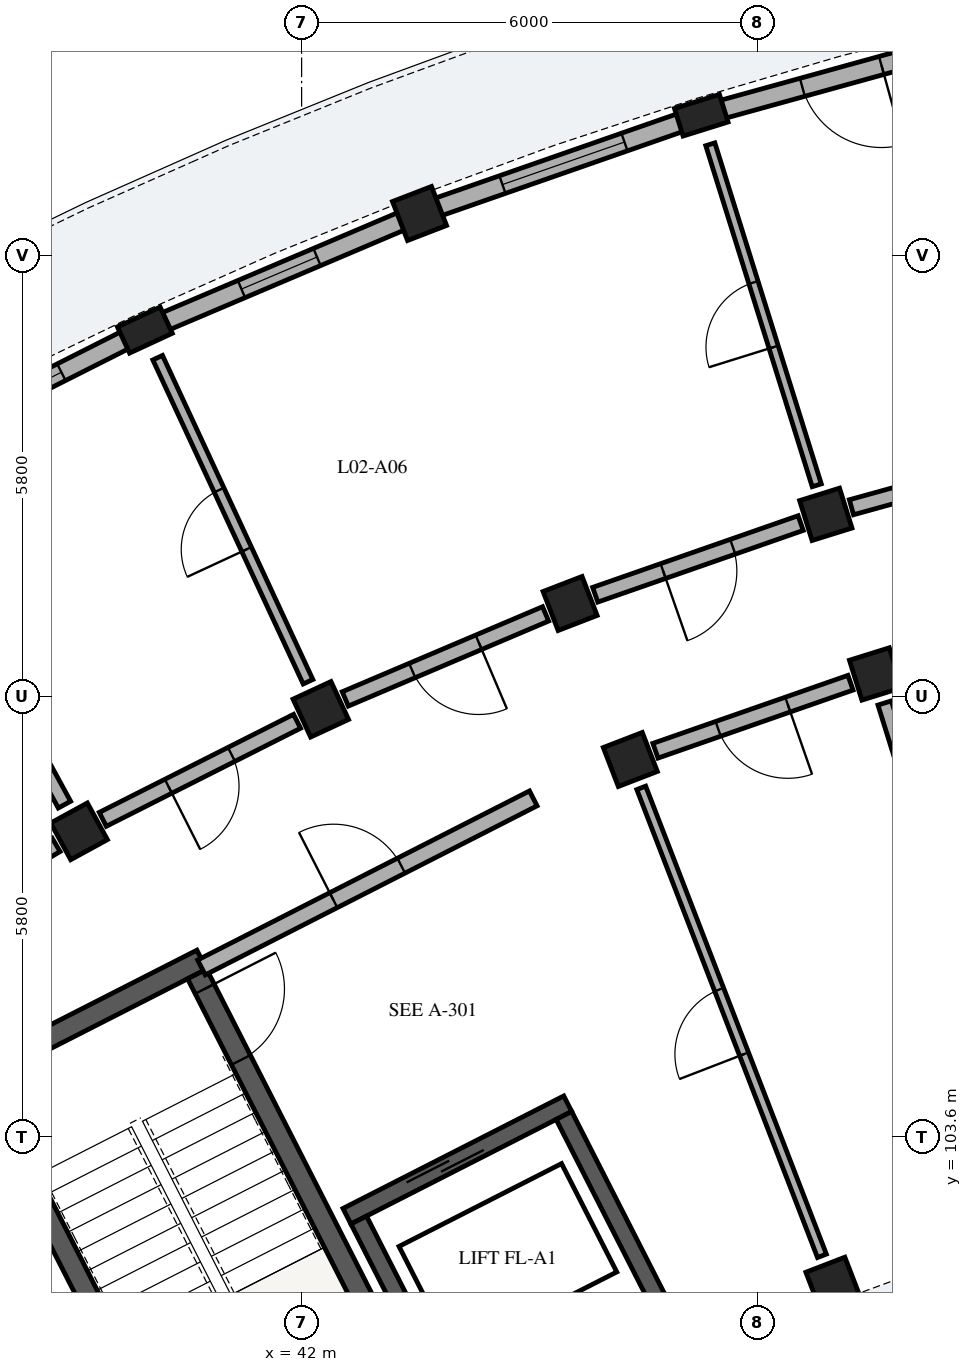
"""IFC4 building model, lengths in metres.
Left out: names, types, materials, properties, quantities, classifications, styles, units other than length and angle.
Written with IfcOpenShell. Run it as: python <this file> out.ifc"""

import sys

from ifc_helpers import new_model, si_unit, direction, frame, frame_2d, origin, origin_2d, place, context, subcontext, project, spatial, rectangle, extrude, element, fill, save


model = new_model("IFC4")
c1 = context("Model", 3, precision=1e-05, world=origin(), true_north=direction((0.0, 1.0)))
c2 = subcontext(c1, "Body", "Model", "MODEL_VIEW")
j1 = project(units=[si_unit("LENGTHUNIT", "METRE"), si_unit("PLANEANGLEUNIT", "RADIAN")], contexts=[c1])
p1 = place(None, origin())
s1 = spatial("IfcSite", under=j1, at=p1, CompositionType="ELEMENT")
p2 = place(p1, origin())
s2 = spatial("IfcBuilding", under=s1, at=p2, CompositionType="ELEMENT")
p3 = place(p2, frame((0.0, 0.0, 8.84)))
s3 = spatial("IfcBuildingStorey", under=s2, at=p3, CompositionType="ELEMENT", Elevation=8.84)
p4 = place(p3, frame((37.773, 104.296, 0.0), z_axis=(0.0, 0.0, 1.0), x_axis=(0.453992276384, -0.891005618941, 0.0)))
e1 = element("IfcWall", 1, at=p4, inside=s3, PredefinedType="SHEAR", context=c2, shape_type="SweptSolid", body=[
    extrude(rectangle(XDim=6.6, YDim=0.28, at=frame_2d((3.3, 0.0))), origin(), (0.0, 0.0, 1.0), 3.11),
])
p5 = place(p3, frame((37.585, 104.357, 0.0), z_axis=(0.0, 0.0, 1.0), x_axis=(0.891020222667, 0.453963613958, 0.0)))
e2 = element("IfcWall", 2, at=p5, inside=s3, PredefinedType="SHEAR", context=c2, shape_type="SweptSolid", body=[
    extrude(rectangle(XDim=3.48, YDim=0.28, at=frame_2d((1.74, 0.0))), origin(), (0.0, 0.0, 1.0), 3.11),
])
p6 = place(p3, frame((40.625, 105.748, 0.0), z_axis=(0.0, 0.0, 1.0), x_axis=(0.453992276384, -0.891005618941, 0.0)))
e3 = element("IfcWall", 3, at=p6, inside=s3, PredefinedType="SHEAR", context=c2, shape_type="SweptSolid", body=[
    extrude(rectangle(XDim=6.6, YDim=0.28, at=frame_2d((3.3, 0.0))), origin(), (0.0, 0.0, 1.0), 3.11),
])
p7 = place(p6, frame((0.22, 0.0, 0.0)))
e4 = element("IfcOpeningElement", 4, at=p7, cuts=e3, PredefinedType="OPENING", context=c2, shape_type="SweptSolid", body=[
    extrude(rectangle(XDim=1.05, YDim=2.15, at=frame_2d((0.525, 1.075))), frame((0.0, 0.15, 0.0), z_axis=(0.0, -1.0, 0.0), x_axis=(1.0, 0.0, 0.0)), (0.0, 0.0, 1.0), 0.3),
])
p8 = place(p3, frame((42.597, 102.561, 0.0), z_axis=(0.0, 0.0, 1.0), x_axis=(0.891001200497, 0.454000947921, 0.0)))
e5 = element("IfcWall", 5, at=p8, inside=s3, PredefinedType="SHEAR", context=c2, shape_type="SweptSolid", body=[
    extrude(rectangle(XDim=3.26, YDim=0.23, at=frame_2d((1.63, 0.0))), origin(), (0.0, 0.0, 1.0), 3.11),
])
p9 = place(p8, frame((0.9, 0.0, 0.0)))
e6 = element("IfcOpeningElement", 6, at=p9, cuts=e5, PredefinedType="OPENING", context=c2, shape_type="SweptSolid", body=[
    extrude(rectangle(XDim=1.1, YDim=2.15, at=frame_2d((0.55, 1.075))), frame((0.0, 0.125, 0.0), z_axis=(0.0, -1.0, 0.0), x_axis=(1.0, 0.0, 0.0)), (0.0, 0.0, 1.0), 0.25),
])
for number, where, z_axis, x_axis in (
    (7, (42.751, 102.511, 0.0), (0.0, 0.0, 1.0), (0.454, -0.891, 0.0)),
    (8, (45.451, 103.886, 0.0), (0.0, 0.0, 1.0), (0.454, -0.891, 0.0)),
):
    element("IfcWall", number, at=place(p3, frame(where, z_axis=z_axis, x_axis=x_axis)), inside=s3, PredefinedType="SHEAR", context=c2, shape_type="SweptSolid", body=[
        extrude(rectangle(XDim=2.7, YDim=0.23, at=frame_2d((1.35, 0.0))), origin(), (0.0, 0.0, 1.0), 3.11),
    ])
for number, where, z_axis, x_axis in (
    (9, (49.552, 109.695, 0.0), (0.0, 0.0, 1.0), (-0.298, 0.955, 0.0)),
    (10, (48.897, 111.795, 0.0), (0.0, 0.0, 1.0), (-0.298, 0.955, 0.0)),
):
    element("IfcColumn", number, at=place(p3, frame(where, z_axis=z_axis, x_axis=x_axis)), inside=s3, PredefinedType="COLUMN", context=c2, shape_type="SweptSolid", body=[
        extrude(rectangle(XDim=0.55, YDim=0.55, at=origin_2d()), origin(), (0.0, 0.0, 1.0), 3.105),
    ])
p10 = place(p3, frame((47.258, 117.046, 0.0), z_axis=(0.0, 0.0, 1.0), x_axis=(-0.297930292146, 0.954587628781, 0.0)))
e11 = element("IfcColumn", 11, at=p10, inside=s3, PredefinedType="PILASTER", context=c2, shape_type="SweptSolid", body=[
    extrude(rectangle(XDim=0.38, YDim=0.62, at=origin_2d()), origin(), (0.0, 0.0, 1.0), 3.105),
])
for number, where, z_axis, x_axis in (
    (12, (48.99, 101.667, 0.0), (0.0, 0.0, 1.0), (-0.36, 0.933, 0.0)),
    (13, (46.325, 108.57, 0.0), (0.0, 0.0, 1.0), (-0.36, 0.933, 0.0)),
    (14, (45.532, 110.622, 0.0), (0.0, 0.0, 1.0), (-0.36, 0.933, 0.0)),
    (15, (43.552, 115.753, 0.0), (0.0, 0.0, 1.0), (-0.36, 0.933, 0.0)),
    (16, (42.252, 109.23, 0.0), (0.0, 0.0, 1.0), (-0.421, 0.907, 0.0)),
):
    element("IfcColumn", number, at=place(p3, frame(where, z_axis=z_axis, x_axis=x_axis)), inside=s3, PredefinedType="COLUMN", context=c2, shape_type="SweptSolid", body=[
        extrude(rectangle(XDim=0.55, YDim=0.55, at=origin_2d()), origin(), (0.0, 0.0, 1.0), 3.105),
    ])
p11 = place(p3, frame((39.938, 114.219, 0.0), z_axis=(0.0, 0.0, 1.0), x_axis=(-0.420859924104, 0.907125638643, 0.0)))
e17 = element("IfcColumn", 17, at=p11, inside=s3, PredefinedType="PILASTER", context=c2, shape_type="SweptSolid", body=[
    extrude(rectangle(XDim=0.38, YDim=0.62, at=origin_2d()), origin(), (0.0, 0.0, 1.0), 3.105),
])
p12 = place(p3, frame((39.072, 107.625, 0.0), z_axis=(0.0, 0.0, 1.0), x_axis=(-0.479713133669, 0.877425386791, 0.0)))
e18 = element("IfcColumn", 18, at=p12, inside=s3, PredefinedType="COLUMN", context=c2, shape_type="SweptSolid", body=[
    extrude(rectangle(XDim=0.55, YDim=0.55, at=origin_2d()), origin(), (0.0, 0.0, 1.0), 3.105),
])
p13 = place(p3, frame((50.806, 118.026, 0.0), z_axis=(0.0, 0.0, 1.0), x_axis=(-0.963899390209, -0.266266718826, 0.0)))
e19 = element("IfcWall", 19, at=p13, inside=s3, PredefinedType="SOLIDWALL", context=c2, shape_type="SweptSolid", body=[
    extrude(rectangle(XDim=3.521, YDim=0.245, at=frame_2d((1.76, 0.0))), origin(), (0.0, 0.0, 1.0), 2.355),
])
p14 = place(p13, frame((1.22, 0.0, 0.0)))
e20 = element("IfcOpeningElement", 20, at=p14, cuts=e19, PredefinedType="OPENING", context=c2, shape_type="SweptSolid", body=[
    extrude(rectangle(XDim=1.08, YDim=2.15, at=frame_2d((0.54, 1.075))), frame((0.0, 0.133, 0.0), z_axis=(0.0, -1.0, 0.0), x_axis=(1.0, 0.0, 0.0)), (0.0, 0.0, 1.0), 0.265),
])
p15 = place(p3, frame((47.107, 116.993, 0.0), z_axis=(0.0, 0.0, 1.0), x_axis=(-0.944267366677, -0.329179495455, 0.0)))
e21 = element("IfcWall", 21, at=p15, inside=s3, PredefinedType="SOLIDWALL", context=c2, shape_type="SweptSolid", body=[
    extrude(rectangle(XDim=3.521, YDim=0.245, at=frame_2d((1.76, 0.0))), origin(), (0.0, 0.0, 1.0), 2.355),
])
p16 = place(p15, frame((0.91, 0.0, 0.35)))
e22 = element("IfcOpeningElement", 22, at=p16, cuts=e21, PredefinedType="OPENING", context=c2, shape_type="SweptSolid", body=[
    extrude(rectangle(XDim=1.7, YDim=1.8, at=frame_2d((0.85, 0.9))), frame((0.0, 0.133, 0.0), z_axis=(0.0, -1.0, 0.0), x_axis=(1.0, 0.0, 0.0)), (0.0, 0.0, 1.0), 0.265),
])
p17 = place(p3, frame((43.326, 115.657, 0.0), z_axis=(0.0, 0.0, 1.0), x_axis=(-0.920502438884, -0.390736816807, 0.0)))
e23 = element("IfcWall", 23, at=p17, inside=s3, PredefinedType="SOLIDWALL", context=c2, shape_type="SweptSolid", body=[
    extrude(rectangle(XDim=3.521, YDim=0.245, at=frame_2d((1.76, 0.0))), origin(), (0.0, 0.0, 1.0), 2.355),
])
p18 = place(p17, frame((1.22, 0.0, 0.55)))
e24 = element("IfcOpeningElement", 24, at=p18, cuts=e23, PredefinedType="OPENING", context=c2, shape_type="SweptSolid", body=[
    extrude(rectangle(XDim=1.08, YDim=1.45, at=frame_2d((0.54, 0.725))), frame((0.0, 0.133, 0.0), z_axis=(0.0, -1.0, 0.0), x_axis=(1.0, 0.0, 0.0)), (0.0, 0.0, 1.0), 0.265),
])
p19 = place(p3, frame((39.795, 114.147, 0.0), z_axis=(0.0, 0.0, 1.0), x_axis=(-0.892756700232, -0.450539092855, 0.0)))
e25 = element("IfcWall", 25, at=p19, inside=s3, PredefinedType="SOLIDWALL", context=c2, shape_type="SweptSolid", body=[
    extrude(rectangle(XDim=3.521, YDim=0.245, at=frame_2d((1.76, 0.0))), origin(), (0.0, 0.0, 1.0), 2.355),
])
p20 = place(p19, frame((1.07, 0.0, 0.55)))
e26 = element("IfcOpeningElement", 26, at=p20, cuts=e25, PredefinedType="OPENING", context=c2, shape_type="SweptSolid", body=[
    extrude(rectangle(XDim=1.38, YDim=1.56, at=frame_2d((0.69, 0.78))), frame((0.0, 0.133, 0.0), z_axis=(0.0, -1.0, 0.0), x_axis=(1.0, 0.0, 0.0)), (0.0, 0.0, 1.0), 0.265),
])
p21 = place(p3, frame((40.682, 105.834, 0.0), z_axis=(0.0, 0.0, 1.0), x_axis=(0.891003372311, 0.453996685595, 0.0)))
e27 = element("IfcWall", 27, at=p21, inside=s3, PredefinedType="PARTITIONING", context=c2, shape_type="SweptSolid", body=[
    extrude(rectangle(XDim=4.9, YDim=0.22, at=frame_2d((2.45, 0.0))), origin(), (0.0, 0.0, 1.0), 2.34),
])
p22 = place(p21, frame((1.95, 0.0, 0.0)))
e28 = element("IfcOpeningElement", 28, at=p22, cuts=e27, PredefinedType="OPENING", context=c2, shape_type="SweptSolid", body=[
    extrude(rectangle(XDim=1.0, YDim=2.15, at=frame_2d((0.5, 1.075))), frame((0.0, 0.12, 0.0), z_axis=(0.0, -1.0, 0.0), x_axis=(1.0, 0.0, 0.0)), (0.0, 0.0, 1.0), 0.24),
])
p23 = place(p3, frame((51.994, 112.651, 0.0), z_axis=(0.0, 0.0, 1.0), x_axis=(-0.963890789093, -0.266297853356, 0.0)))
e29 = element("IfcWall", 29, at=p23, inside=s3, PredefinedType="PARTITIONING", context=c2, shape_type="SweptSolid", body=[
    extrude(rectangle(XDim=2.863, YDim=0.205, at=frame_2d((1.432, 0.0))), origin(), (0.0, 0.0, 1.0), 2.37),
])
p24 = place(p23, frame((0.937, 0.0, 0.0)))
e30 = element("IfcOpeningElement", 30, at=p24, cuts=e29, PredefinedType="OPENING", context=c2, shape_type="SweptSolid", body=[
    extrude(rectangle(XDim=0.99, YDim=2.16, at=frame_2d((0.495, 1.08))), frame((0.0, 0.113, 0.0), z_axis=(0.0, -1.0, 0.0), x_axis=(1.0, 0.0, 0.0)), (0.0, 0.0, 1.0), 0.225),
])
p25 = place(p3, frame((48.778, 112.177, 0.0), z_axis=(0.0, 0.0, 1.0), x_axis=(-0.297905254614, 0.954595442726, 0.0)))
e31 = element("IfcWall", 31, at=p25, inside=s3, PredefinedType="PARTITIONING", context=c2, shape_type="SweptSolid", body=[
    extrude(rectangle(XDim=4.7, YDim=0.125, at=frame_2d((2.35, 0.0))), origin(), (0.0, 0.0, 1.0), 2.37),
])
p26 = place(p25, frame((1.905, 0.0, 0.0)))
e32 = element("IfcOpeningElement", 32, at=p26, cuts=e31, PredefinedType="OPENING", context=c2, shape_type="SweptSolid", body=[
    extrude(rectangle(XDim=0.89, YDim=2.1, at=frame_2d((0.445, 1.05))), frame((0.0, 0.073, 0.0), z_axis=(0.0, -1.0, 0.0), x_axis=(1.0, 0.0, 0.0)), (0.0, 0.0, 1.0), 0.145),
])
p27 = place(p3, frame((51.638, 103.013, 0.0), z_axis=(0.0, 0.0, 1.0), x_axis=(-0.2979590431, 0.954578655028, 0.0)))
e33 = element("IfcWall", 33, at=p27, inside=s3, PredefinedType="PARTITIONING", context=c2, shape_type="SweptSolid", body=[
    extrude(rectangle(XDim=6.6, YDim=0.185, at=frame_2d((3.3, 0.0))), origin(), (0.0, 0.0, 1.0), 2.37),
])
p28 = place(p3, frame((48.566, 111.68, 0.0), z_axis=(0.0, 0.0, 1.0), x_axis=(-0.944253820929, -0.329218349522, 0.0)))
e34 = element("IfcWall", 34, at=p28, inside=s3, PredefinedType="PARTITIONING", context=c2, shape_type="SweptSolid", body=[
    extrude(rectangle(XDim=2.863, YDim=0.205, at=frame_2d((1.432, 0.0))), origin(), (0.0, 0.0, 1.0), 2.37),
])
p29 = place(p28, frame((0.947, 0.0, 0.0)))
e35 = element("IfcOpeningElement", 35, at=p29, cuts=e34, PredefinedType="OPENING", context=c2, shape_type="SweptSolid", body=[
    extrude(rectangle(XDim=0.97, YDim=2.15, at=frame_2d((0.485, 1.075))), frame((0.0, 0.113, 0.0), z_axis=(0.0, -1.0, 0.0), x_axis=(1.0, 0.0, 0.0)), (0.0, 0.0, 1.0), 0.225),
])
p30 = place(p3, frame((49.222, 109.58, 0.0), z_axis=(0.0, 0.0, 1.0), x_axis=(-0.944265123647, -0.329185929627, 0.0)))
e36 = element("IfcWall", 36, at=p30, inside=s3, PredefinedType="PARTITIONING", context=c2, shape_type="SweptSolid", body=[
    extrude(rectangle(XDim=2.718, YDim=0.205, at=frame_2d((1.359, 0.0))), origin(), (0.0, 0.0, 1.0), 2.37),
])
p31 = place(p30, frame((0.874, 0.0, 0.0)))
e37 = element("IfcOpeningElement", 37, at=p31, cuts=e36, PredefinedType="OPENING", context=c2, shape_type="SweptSolid", body=[
    extrude(rectangle(XDim=0.97, YDim=2.15, at=frame_2d((0.485, 1.075))), frame((0.0, 0.113, 0.0), z_axis=(0.0, -1.0, 0.0), x_axis=(1.0, 0.0, 0.0)), (0.0, 0.0, 1.0), 0.225),
])
p32 = place(p3, frame((48.846, 102.04, 0.0), z_axis=(0.0, 0.0, 1.0), x_axis=(-0.360183473608, 0.932881485152, 0.0)))
e38 = element("IfcWall", 38, at=p32, inside=s3, PredefinedType="PARTITIONING", context=c2, shape_type="SweptSolid", body=[
    extrude(rectangle(XDim=6.6, YDim=0.125, at=frame_2d((3.3, 0.0))), origin(), (0.0, 0.0, 1.0), 2.37),
])
p33 = place(p32, frame((2.845, 0.0, 0.0)))
e39 = element("IfcOpeningElement", 39, at=p33, cuts=e38, PredefinedType="OPENING", context=c2, shape_type="SweptSolid", body=[
    extrude(rectangle(XDim=0.91, YDim=2.1, at=frame_2d((0.455, 1.05))), frame((0.0, 0.073, 0.0), z_axis=(0.0, -1.0, 0.0), x_axis=(1.0, 0.0, 0.0)), (0.0, 0.0, 1.0), 0.145),
])
p34 = place(p3, frame((45.21, 110.486, 0.0), z_axis=(0.0, 0.0, 1.0), x_axis=(-0.920511160294, -0.390716270168, 0.0)))
e40 = element("IfcWall", 40, at=p34, inside=s3, PredefinedType="PARTITIONING", context=c2, shape_type="SweptSolid", body=[
    extrude(rectangle(XDim=2.863, YDim=0.205, at=frame_2d((1.432, 0.0))), origin(), (0.0, 0.0, 1.0), 2.37),
])
p35 = place(p34, frame((0.957, 0.0, 0.0)))
e41 = element("IfcOpeningElement", 41, at=p35, cuts=e40, PredefinedType="OPENING", context=c2, shape_type="SweptSolid", body=[
    extrude(rectangle(XDim=0.95, YDim=2.13, at=frame_2d((0.475, 1.065))), frame((0.0, 0.113, 0.0), z_axis=(0.0, -1.0, 0.0), x_axis=(1.0, 0.0, 0.0)), (0.0, 0.0, 1.0), 0.225),
])
p36 = place(p3, frame((42.084, 109.593, 0.0), z_axis=(0.0, 0.0, 1.0), x_axis=(-0.420862519045, 0.907124434718, 0.0)))
e42 = element("IfcWall", 42, at=p36, inside=s3, PredefinedType="PLUMBINGWALL", context=c2, shape_type="SweptSolid", body=[
    extrude(rectangle(XDim=4.7, YDim=0.14, at=frame_2d((2.35, 0.0))), origin(), (0.0, 0.0, 1.0), 2.37),
])
p37 = place(p36, frame((1.92, 0.0, 0.0)))
e43 = element("IfcOpeningElement", 43, at=p37, cuts=e42, PredefinedType="OPENING", context=c2, shape_type="SweptSolid", body=[
    extrude(rectangle(XDim=0.86, YDim=2.06, at=frame_2d((0.43, 1.03))), frame((0.0, 0.08, 0.0), z_axis=(0.0, -1.0, 0.0), x_axis=(1.0, 0.0, 0.0)), (0.0, 0.0, 1.0), 0.16),
])
p38 = place(p3, frame((41.94, 109.073, 0.0), z_axis=(0.0, 0.0, 1.0), x_axis=(-0.89273239336, -0.450587254419, 0.0)))
e44 = element("IfcWall", 44, at=p38, inside=s3, PredefinedType="PARTITIONING", context=c2, shape_type="SweptSolid", body=[
    extrude(rectangle(XDim=2.863, YDim=0.205, at=frame_2d((1.432, 0.0))), origin(), (0.0, 0.0, 1.0), 2.37),
])
p39 = place(p38, frame((0.967, 0.0, 0.0)))
e45 = element("IfcOpeningElement", 45, at=p39, cuts=e44, PredefinedType="OPENING", context=c2, shape_type="SweptSolid", body=[
    extrude(rectangle(XDim=0.93, YDim=2.12, at=frame_2d((0.465, 1.06))), frame((0.0, 0.113, 0.0), z_axis=(0.0, -1.0, 0.0), x_axis=(1.0, 0.0, 0.0)), (0.0, 0.0, 1.0), 0.225),
])
p40 = place(p3, frame((38.88, 107.976, 0.0), z_axis=(0.0, 0.0, 1.0), x_axis=(-0.479721743761, 0.877420679357, 0.0)))
e46 = element("IfcWall", 46, at=p40, inside=s3, PredefinedType="PARTITIONING", context=c2, shape_type="SweptSolid", body=[
    extrude(rectangle(XDim=4.7, YDim=0.185, at=frame_2d((2.35, 0.0))), origin(), (0.0, 0.0, 1.0), 2.37),
])
p41 = place(p3, frame((38.77, 107.447, 0.0), z_axis=(0.0, 0.0, 1.0), x_axis=(-0.861113214678, -0.508413248753, 0.0)))
e47 = element("IfcWall", 47, at=p41, inside=s3, PredefinedType="PARTITIONING", context=c2, shape_type="SweptSolid", body=[
    extrude(rectangle(XDim=2.863, YDim=0.205, at=frame_2d((1.432, 0.0))), origin(), (0.0, 0.0, 1.0), 2.37),
])
p42 = place(p41, frame((0.937, 0.0, 0.0)))
e48 = element("IfcOpeningElement", 48, at=p42, cuts=e47, PredefinedType="OPENING", context=c2, shape_type="SweptSolid", body=[
    extrude(rectangle(XDim=0.99, YDim=2.16, at=frame_2d((0.495, 1.08))), frame((0.0, 0.113, 0.0), z_axis=(0.0, -1.0, 0.0), x_axis=(1.0, 0.0, 0.0)), (0.0, 0.0, 1.0), 0.225),
])
p43 = place(p14, origin())
e49 = element("IfcDoor", 49, at=p43, inside=s3, OperationType="SINGLE_SWING_LEFT", PredefinedType="DOOR", context=c2, shape_type="SweptSolid", body=[
    extrude(rectangle(XDim=1.08, YDim=2.15, at=frame_2d((0.54, 1.075))), frame((0.0, 0.025, 0.0), z_axis=(0.0, -1.0, 0.0), x_axis=(1.0, 0.0, 0.0)), (0.0, 0.0, 1.0), 0.05),
])
fill(e20, e49)
p44 = place(p16, origin())
e50 = element("IfcWindow", 50, at=p44, inside=s3, PartitioningType="SINGLE_PANEL", PredefinedType="WINDOW", context=c2, shape_type="SweptSolid", body=[
    extrude(rectangle(XDim=1.7, YDim=1.8, at=frame_2d((0.85, 0.9))), frame((0.0, 0.03, 0.0), z_axis=(0.0, -1.0, 0.0), x_axis=(1.0, 0.0, 0.0)), (0.0, 0.0, 1.0), 0.06),
])
fill(e22, e50)
p45 = place(p18, origin())
e51 = element("IfcWindow", 51, at=p45, inside=s3, PartitioningType="SINGLE_PANEL", PredefinedType="WINDOW", context=c2, shape_type="SweptSolid", body=[
    extrude(rectangle(XDim=1.08, YDim=1.45, at=frame_2d((0.54, 0.725))), frame((0.0, 0.03, 0.0), z_axis=(0.0, -1.0, 0.0), x_axis=(1.0, 0.0, 0.0)), (0.0, 0.0, 1.0), 0.06),
])
fill(e24, e51)
p46 = place(p20, origin())
e52 = element("IfcWindow", 52, at=p46, inside=s3, PartitioningType="SINGLE_PANEL", PredefinedType="WINDOW", context=c2, shape_type="SweptSolid", body=[
    extrude(rectangle(XDim=1.38, YDim=1.56, at=frame_2d((0.69, 0.78))), frame((0.0, 0.03, 0.0), z_axis=(0.0, -1.0, 0.0), x_axis=(1.0, 0.0, 0.0)), (0.0, 0.0, 1.0), 0.06),
])
fill(e26, e52)
p47 = place(p7, origin())
e53 = element("IfcDoor", 53, at=p47, inside=s3, OperationType="SINGLE_SWING_LEFT", PredefinedType="DOOR", context=c2, shape_type="SweptSolid", body=[
    extrude(rectangle(XDim=1.05, YDim=2.15, at=frame_2d((0.525, 1.075))), frame((0.0, 0.025, 0.0), z_axis=(0.0, -1.0, 0.0), x_axis=(1.0, 0.0, 0.0)), (0.0, 0.0, 1.0), 0.05),
])
fill(e4, e53)
p48 = place(p9, origin())
e54 = element("IfcDoor", 54, at=p48, inside=s3, OperationType="DOUBLE_DOOR_SLIDING", PredefinedType="DOOR", context=c2, shape_type="SweptSolid", body=[
    extrude(rectangle(XDim=1.1, YDim=2.15, at=frame_2d((0.55, 1.075))), frame((0.0, 0.025, 0.0), z_axis=(0.0, -1.0, 0.0), x_axis=(1.0, 0.0, 0.0)), (0.0, 0.0, 1.0), 0.05),
])
fill(e6, e54)
p49 = place(p22, origin())
e55 = element("IfcDoor", 55, at=p49, inside=s3, OperationType="SINGLE_SWING_LEFT", PredefinedType="DOOR", context=c2, shape_type="SweptSolid", body=[
    extrude(rectangle(XDim=1.0, YDim=2.15, at=frame_2d((0.5, 1.075))), frame((0.0, 0.025, 0.0), z_axis=(0.0, -1.0, 0.0), x_axis=(1.0, 0.0, 0.0)), (0.0, 0.0, 1.0), 0.05),
])
fill(e28, e55)
p50 = place(p26, origin())
e56 = element("IfcDoor", 56, at=p50, inside=s3, OperationType="SINGLE_SWING_LEFT", PredefinedType="DOOR", context=c2, shape_type="SweptSolid", body=[
    extrude(rectangle(XDim=0.89, YDim=2.1, at=frame_2d((0.445, 1.05))), frame((0.0, 0.025, 0.0), z_axis=(0.0, -1.0, 0.0), x_axis=(1.0, 0.0, 0.0)), (0.0, 0.0, 1.0), 0.05),
])
fill(e32, e56)
p51 = place(p29, origin())
e57 = element("IfcDoor", 57, at=p51, inside=s3, OperationType="SINGLE_SWING_RIGHT", PredefinedType="DOOR", context=c2, shape_type="SweptSolid", body=[
    extrude(rectangle(XDim=0.97, YDim=2.15, at=frame_2d((0.485, 1.075))), frame((0.0, 0.025, 0.0), z_axis=(0.0, -1.0, 0.0), x_axis=(1.0, 0.0, 0.0)), (0.0, 0.0, 1.0), 0.05),
])
fill(e35, e57)
p52 = place(p31, origin())
e58 = element("IfcDoor", 58, at=p52, inside=s3, OperationType="SINGLE_SWING_LEFT", PredefinedType="DOOR", context=c2, shape_type="SweptSolid", body=[
    extrude(rectangle(XDim=0.97, YDim=2.15, at=frame_2d((0.485, 1.075))), frame((0.0, 0.025, 0.0), z_axis=(0.0, -1.0, 0.0), x_axis=(1.0, 0.0, 0.0)), (0.0, 0.0, 1.0), 0.05),
])
fill(e37, e58)
p53 = place(p33, origin())
e59 = element("IfcDoor", 59, at=p53, inside=s3, OperationType="SINGLE_SWING_LEFT", PredefinedType="DOOR", context=c2, shape_type="SweptSolid", body=[
    extrude(rectangle(XDim=0.91, YDim=2.1, at=frame_2d((0.455, 1.05))), frame((0.0, 0.025, 0.0), z_axis=(0.0, -1.0, 0.0), x_axis=(1.0, 0.0, 0.0)), (0.0, 0.0, 1.0), 0.05),
])
fill(e39, e59)
p54 = place(p35, origin())
e60 = element("IfcDoor", 60, at=p54, inside=s3, OperationType="SINGLE_SWING_LEFT", PredefinedType="DOOR", context=c2, shape_type="SweptSolid", body=[
    extrude(rectangle(XDim=0.95, YDim=2.13, at=frame_2d((0.475, 1.065))), frame((0.0, 0.025, 0.0), z_axis=(0.0, -1.0, 0.0), x_axis=(1.0, 0.0, 0.0)), (0.0, 0.0, 1.0), 0.05),
])
fill(e41, e60)
p55 = place(p37, origin())
e61 = element("IfcDoor", 61, at=p55, inside=s3, OperationType="SINGLE_SWING_LEFT", PredefinedType="DOOR", context=c2, shape_type="SweptSolid", body=[
    extrude(rectangle(XDim=0.86, YDim=2.06, at=frame_2d((0.43, 1.03))), frame((0.0, 0.025, 0.0), z_axis=(0.0, -1.0, 0.0), x_axis=(1.0, 0.0, 0.0)), (0.0, 0.0, 1.0), 0.05),
])
fill(e43, e61)
p56 = place(p39, origin())
e62 = element("IfcDoor", 62, at=p56, inside=s3, OperationType="SINGLE_SWING_RIGHT", PredefinedType="DOOR", context=c2, shape_type="SweptSolid", body=[
    extrude(rectangle(XDim=0.93, YDim=2.12, at=frame_2d((0.465, 1.06))), frame((0.0, 0.025, 0.0), z_axis=(0.0, -1.0, 0.0), x_axis=(1.0, 0.0, 0.0)), (0.0, 0.0, 1.0), 0.05),
])
fill(e45, e62)
save(model, sys.argv[1])
